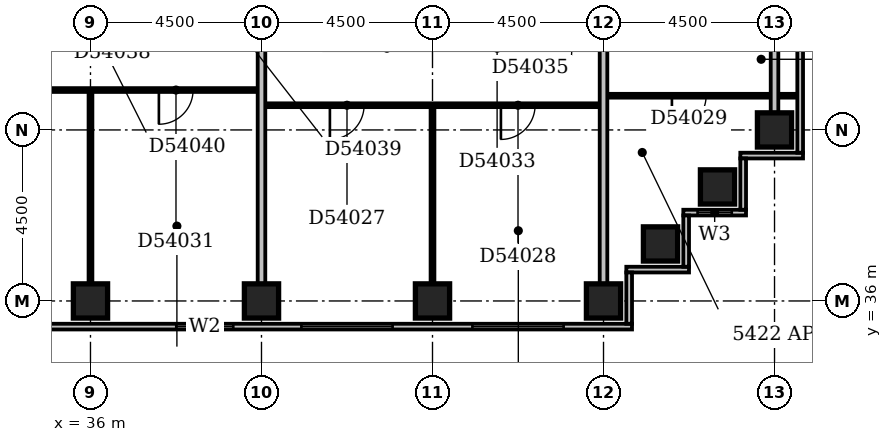
"""IFC4 building model, lengths in metres.
Left out: names, types, materials, properties, quantities, classifications, styles, units other than length and angle.
Written with IfcOpenShell. Run it as: python <this file> out.ifc"""

import sys

from ifc_helpers import new_model, si_unit, direction, frame, frame_2d, origin, origin_2d, place, context, subcontext, project, spatial, rectangle, extrude, element, fill, save


model = new_model("IFC4")
c1 = context("Model", 3, precision=1e-05, world=origin(), true_north=direction((0.0, 1.0)))
c2 = subcontext(c1, "Body", "Model", "MODEL_VIEW")
j1 = project(units=[si_unit("LENGTHUNIT", "METRE"), si_unit("PLANEANGLEUNIT", "RADIAN")], contexts=[c1])
p1 = place(None, origin())
s1 = spatial("IfcSite", under=j1, at=p1, CompositionType="ELEMENT")
p2 = place(p1, origin())
s2 = spatial("IfcBuilding", under=s1, at=p2, CompositionType="ELEMENT")
p3 = place(p2, frame((0.0, 0.0, 211.4)))
s3 = spatial("IfcBuildingStorey", under=s2, at=p3, CompositionType="ELEMENT", Elevation=211.4)
for number, where, z_axis, x_axis in (
    (1, (36.0, 36.0, -0.35), (0.0, 0.0, 1.0), (1.0, 0.0, 0.0)),
    (2, (40.5, 36.0, -0.35), (0.0, 0.0, 1.0), (1.0, 0.0, 0.0)),
    (3, (45.0, 36.0, -0.35), (0.0, 0.0, 1.0), (1.0, 0.0, 0.0)),
    (4, (49.5, 36.0, -0.35), (0.0, 0.0, 1.0), (1.0, 0.0, 0.0)),
    (5, (51.0, 37.5, -0.35), (0.0, 0.0, 1.0), (1.0, 0.0, 0.0)),
    (6, (52.5, 39.0, -0.35), (0.0, 0.0, 1.0), (1.0, 0.0, 0.0)),
    (7, (54.0, 40.5, -0.35), (0.0, 0.0, 1.0), (1.0, 0.0, 0.0)),
):
    element("IfcColumn", number, at=place(p3, frame(where, z_axis=z_axis, x_axis=x_axis)), inside=s3, PredefinedType="COLUMN", context=c2, shape_type="SweptSolid", body=[
        extrude(rectangle(XDim=0.9, YDim=0.9, at=origin_2d()), origin(), (0.0, 0.0, 1.0), 3.65),
    ])
p4 = place(p3, frame((23.1, 35.325, 0.0), z_axis=(0.0, 0.0, 1.0), x_axis=(1.0, 0.0, 0.0)))
e8 = element("IfcWall", 8, at=p4, inside=s3, PredefinedType="STANDARD", context=c2, shape_type="SweptSolid", body=[
    extrude(rectangle(XDim=27.15, YDim=0.15, at=frame_2d((13.575, 0.0))), origin(), (0.0, 0.0, 1.0), 2.7),
])
p5 = place(p4, frame((0.45, 0.0, 0.6)))
e9 = element("IfcOpeningElement", 9, at=p5, cuts=e8, PredefinedType="OPENING", context=c2, shape_type="SweptSolid", body=[
    extrude(rectangle(XDim=2.4, YDim=1.8, at=frame_2d((1.2, 0.9))), frame((0.0, 0.087, 0.0), z_axis=(0.0, -1.0, 0.0), x_axis=(1.0, 0.0, 0.0)), (0.0, 0.0, 1.0), 0.174),
])
p6 = place(p4, frame((4.95, 0.0, 0.6)))
e10 = element("IfcOpeningElement", 10, at=p6, cuts=e8, PredefinedType="OPENING", context=c2, shape_type="SweptSolid", body=[
    extrude(rectangle(XDim=2.4, YDim=1.8, at=frame_2d((1.2, 0.9))), frame((0.0, 0.087, 0.0), z_axis=(0.0, -1.0, 0.0), x_axis=(1.0, 0.0, 0.0)), (0.0, 0.0, 1.0), 0.174),
])
p7 = place(p4, frame((9.062, 0.0, 0.6)))
e11 = element("IfcOpeningElement", 11, at=p7, cuts=e8, PredefinedType="OPENING", context=c2, shape_type="SweptSolid", body=[
    extrude(rectangle(XDim=1.8, YDim=1.8, at=frame_2d((0.9, 0.9))), frame((0.0, 0.087, 0.0), z_axis=(0.0, -1.0, 0.0), x_axis=(1.0, 0.0, 0.0)), (0.0, 0.0, 1.0), 0.174),
])
p8 = place(p4, frame((15.157, 0.0, 0.6)))
e12 = element("IfcOpeningElement", 12, at=p8, cuts=e8, PredefinedType="OPENING", context=c2, shape_type="SweptSolid", body=[
    extrude(rectangle(XDim=1.5, YDim=1.8, at=frame_2d((0.75, 0.9))), frame((0.0, 0.087, 0.0), z_axis=(0.0, -1.0, 0.0), x_axis=(1.0, 0.0, 0.0)), (0.0, 0.0, 1.0), 0.174),
])
p9 = place(p4, frame((18.45, 0.0, 0.6)))
e13 = element("IfcOpeningElement", 13, at=p9, cuts=e8, PredefinedType="OPENING", context=c2, shape_type="SweptSolid", body=[
    extrude(rectangle(XDim=2.4, YDim=1.8, at=frame_2d((1.2, 0.9))), frame((0.0, 0.087, 0.0), z_axis=(0.0, -1.0, 0.0), x_axis=(1.0, 0.0, 0.0)), (0.0, 0.0, 1.0), 0.174),
])
p10 = place(p4, frame((22.95, 0.0, 0.6)))
e14 = element("IfcOpeningElement", 14, at=p10, cuts=e8, PredefinedType="OPENING", context=c2, shape_type="SweptSolid", body=[
    extrude(rectangle(XDim=2.4, YDim=1.8, at=frame_2d((1.2, 0.9))), frame((0.0, 0.087, 0.0), z_axis=(0.0, -1.0, 0.0), x_axis=(1.0, 0.0, 0.0)), (0.0, 0.0, 1.0), 0.174),
])
p11 = place(p3, frame((50.175, 35.4, 0.0), z_axis=(0.0, 0.0, 1.0), x_axis=(0.0, 1.0, 0.0)))
e15 = element("IfcWall", 15, at=p11, inside=s3, PredefinedType="STANDARD", context=c2, shape_type="SweptSolid", body=[
    extrude(rectangle(XDim=1.35, YDim=0.15, at=frame_2d((0.675, 0.0))), origin(), (0.0, 0.0, 1.0), 2.7),
])
p12 = place(p3, frame((50.1, 36.825, 0.0), z_axis=(0.0, 0.0, 1.0), x_axis=(1.0, 0.0, 0.0)))
e16 = element("IfcWall", 16, at=p12, inside=s3, PredefinedType="STANDARD", context=c2, shape_type="SweptSolid", body=[
    extrude(rectangle(XDim=1.65, YDim=0.15, at=frame_2d((0.825, 0.0))), origin(), (0.0, 0.0, 1.0), 2.7),
])
p13 = place(p3, frame((51.675, 36.9, 0.0), z_axis=(0.0, 0.0, 1.0), x_axis=(0.0, 1.0, 0.0)))
e17 = element("IfcWall", 17, at=p13, inside=s3, PredefinedType="STANDARD", context=c2, shape_type="SweptSolid", body=[
    extrude(rectangle(XDim=1.35, YDim=0.15, at=frame_2d((0.675, 0.0))), origin(), (0.0, 0.0, 1.0), 2.7),
])
p14 = place(p3, frame((51.6, 38.325, 0.0), z_axis=(0.0, 0.0, 1.0), x_axis=(1.0, 0.0, 0.0)))
e18 = element("IfcWall", 18, at=p14, inside=s3, PredefinedType="STANDARD", context=c2, shape_type="SweptSolid", body=[
    extrude(rectangle(XDim=1.65, YDim=0.15, at=frame_2d((0.825, 0.0))), origin(), (0.0, 0.0, 1.0), 2.7),
])
p15 = place(p14, frame((0.375, 0.0, 0.6)))
e19 = element("IfcOpeningElement", 19, at=p15, cuts=e18, PredefinedType="OPENING", context=c2, shape_type="SweptSolid", body=[
    extrude(rectangle(XDim=0.9, YDim=1.8, at=frame_2d((0.45, 0.9))), frame((0.0, 0.087, 0.0), z_axis=(0.0, -1.0, 0.0), x_axis=(1.0, 0.0, 0.0)), (0.0, 0.0, 1.0), 0.174),
])
p16 = place(p3, frame((53.175, 38.4, 0.0), z_axis=(0.0, 0.0, 1.0), x_axis=(0.0, 1.0, 0.0)))
e20 = element("IfcWall", 20, at=p16, inside=s3, PredefinedType="STANDARD", context=c2, shape_type="SweptSolid", body=[
    extrude(rectangle(XDim=1.35, YDim=0.15, at=frame_2d((0.675, 0.0))), origin(), (0.0, 0.0, 1.0), 2.7),
])
p17 = place(p3, frame((53.1, 39.825, 0.0), z_axis=(0.0, 0.0, 1.0), x_axis=(1.0, 0.0, 0.0)))
e21 = element("IfcWall", 21, at=p17, inside=s3, PredefinedType="STANDARD", context=c2, shape_type="SweptSolid", body=[
    extrude(rectangle(XDim=1.65, YDim=0.15, at=frame_2d((0.825, 0.0))), origin(), (0.0, 0.0, 1.0), 2.7),
])
p18 = place(p3, frame((54.675, 39.9, 0.0), z_axis=(0.0, 0.0, 1.0), x_axis=(0.0, 1.0, 0.0)))
e22 = element("IfcWall", 22, at=p18, inside=s3, PredefinedType="STANDARD", context=c2, shape_type="SweptSolid", body=[
    extrude(rectangle(XDim=14.85, YDim=0.15, at=frame_2d((7.425, 0.0))), origin(), (0.0, 0.0, 1.0), 2.7),
])
p19 = place(p3, frame((36.0, 36.45, 0.0), z_axis=(0.0, 0.0, 1.0), x_axis=(0.0, 1.0, 0.0)))
e23 = element("IfcWall", 23, at=p19, inside=s3, PredefinedType="PARTITIONING", context=c2, shape_type="SweptSolid", body=[
    extrude(rectangle(XDim=5.05, YDim=0.1, at=frame_2d((2.525, 0.0))), origin(), (0.0, 0.0, 1.0), 2.4),
])
p20 = place(p3, frame((40.5, 36.45, 0.0), z_axis=(0.0, 0.0, 1.0), x_axis=(0.0, 1.0, 0.0)))
e24 = element("IfcWall", 24, at=p20, inside=s3, PredefinedType="PARTITIONING", context=c2, shape_type="SweptSolid", body=[
    extrude(rectangle(XDim=12.95, YDim=0.2, at=frame_2d((6.475, 0.0))), origin(), (0.0, 0.0, 1.0), 3.3),
])
p21 = place(p3, frame((45.0, 36.45, 0.0), z_axis=(0.0, 0.0, 1.0), x_axis=(0.0, 1.0, 0.0)))
e25 = element("IfcWall", 25, at=p21, inside=s3, PredefinedType="PARTITIONING", context=c2, shape_type="SweptSolid", body=[
    extrude(rectangle(XDim=4.65, YDim=0.1, at=frame_2d((2.325, 0.0))), origin(), (0.0, 0.0, 1.0), 2.6),
])
p22 = place(p3, frame((49.5, 36.45, 0.0), z_axis=(0.0, 0.0, 1.0), x_axis=(0.0, 1.0, 0.0)))
e26 = element("IfcWall", 26, at=p22, inside=s3, PredefinedType="PARTITIONING", context=c2, shape_type="SweptSolid", body=[
    extrude(rectangle(XDim=12.95, YDim=0.2, at=frame_2d((6.475, 0.0))), origin(), (0.0, 0.0, 1.0), 3.3),
])
p23 = place(p3, frame((54.0, 40.95, 0.0), z_axis=(0.0, 0.0, 1.0), x_axis=(0.0, 1.0, 0.0)))
e27 = element("IfcWall", 27, at=p23, inside=s3, PredefinedType="PARTITIONING", context=c2, shape_type="SweptSolid", body=[
    extrude(rectangle(XDim=8.1, YDim=0.2, at=frame_2d((4.05, 0.0))), origin(), (0.0, 0.0, 1.0), 2.7),
])
p24 = place(p3, frame((40.6, 41.15, 0.0), z_axis=(0.0, 0.0, 1.0), x_axis=(1.0, 0.0, 0.0)))
e28 = element("IfcWall", 28, at=p24, inside=s3, PredefinedType="PARTITIONING", context=c2, shape_type="SweptSolid", body=[
    extrude(rectangle(XDim=8.8, YDim=0.1, at=frame_2d((4.4, 0.0))), origin(), (0.0, 0.0, 1.0), 3.3),
])
p25 = place(p24, frame((1.7, 0.0, 0.0)))
e29 = element("IfcOpeningElement", 29, at=p25, cuts=e28, PredefinedType="OPENING", context=c2, shape_type="SweptSolid", body=[
    extrude(rectangle(XDim=0.9, YDim=2.1, at=frame_2d((0.45, 1.05))), frame((0.0, 0.062, 0.0), z_axis=(0.0, -1.0, 0.0), x_axis=(1.0, 0.0, 0.0)), (0.0, 0.0, 1.0), 0.124),
])
p26 = place(p24, frame((6.2, 0.0, 0.0)))
e30 = element("IfcOpeningElement", 30, at=p26, cuts=e28, PredefinedType="OPENING", context=c2, shape_type="SweptSolid", body=[
    extrude(rectangle(XDim=0.9, YDim=2.1, at=frame_2d((0.45, 1.05))), frame((0.0, 0.062, 0.0), z_axis=(0.0, -1.0, 0.0), x_axis=(1.0, 0.0, 0.0)), (0.0, 0.0, 1.0), 0.124),
])
p27 = place(p3, frame((49.6, 41.4, 0.0), z_axis=(0.0, 0.0, 1.0), x_axis=(1.0, 0.0, 0.0)))
e31 = element("IfcWall", 31, at=p27, inside=s3, PredefinedType="PARTITIONING", context=c2, shape_type="SweptSolid", body=[
    extrude(rectangle(XDim=5.0, YDim=0.1, at=frame_2d((2.5, 0.0))), origin(), (0.0, 0.0, 1.0), 3.3),
])
p28 = place(p27, frame((1.7, 0.0, 0.0)))
e32 = element("IfcOpeningElement", 32, at=p28, cuts=e31, PredefinedType="OPENING", context=c2, shape_type="SweptSolid", body=[
    extrude(rectangle(XDim=0.9, YDim=2.1, at=frame_2d((0.45, 1.05))), frame((0.0, 0.062, 0.0), z_axis=(0.0, -1.0, 0.0), x_axis=(1.0, 0.0, 0.0)), (0.0, 0.0, 1.0), 0.124),
])
p29 = place(p3, frame((27.1, 41.55, 0.0), z_axis=(0.0, 0.0, 1.0), x_axis=(1.0, 0.0, 0.0)))
e33 = element("IfcWall", 33, at=p29, inside=s3, PredefinedType="PARTITIONING", context=c2, shape_type="SweptSolid", body=[
    extrude(rectangle(XDim=13.3, YDim=0.1, at=frame_2d((6.65, 0.0))), origin(), (0.0, 0.0, 1.0), 3.3),
])
p30 = place(p29, frame((3.9, 0.0, 0.0)))
e34 = element("IfcOpeningElement", 34, at=p30, cuts=e33, PredefinedType="OPENING", context=c2, shape_type="SweptSolid", body=[
    extrude(rectangle(XDim=0.9, YDim=2.1, at=frame_2d((0.45, 1.05))), frame((0.0, 0.062, 0.0), z_axis=(0.0, -1.0, 0.0), x_axis=(1.0, 0.0, 0.0)), (0.0, 0.0, 1.0), 0.124),
])
p31 = place(p29, frame((10.7, 0.0, 0.0)))
e35 = element("IfcOpeningElement", 35, at=p31, cuts=e33, PredefinedType="OPENING", context=c2, shape_type="SweptSolid", body=[
    extrude(rectangle(XDim=0.9, YDim=2.1, at=frame_2d((0.45, 1.05))), frame((0.0, 0.062, 0.0), z_axis=(0.0, -1.0, 0.0), x_axis=(1.0, 0.0, 0.0)), (0.0, 0.0, 1.0), 0.124),
])
p32 = place(p8, origin())
e36 = element("IfcWindow", 36, at=p32, inside=s3, PartitioningType="SINGLE_PANEL", PredefinedType="WINDOW", context=c2, shape_type="SweptSolid", body=[
    extrude(rectangle(XDim=1.5, YDim=1.8, at=frame_2d((0.75, 0.9))), frame((0.0, 0.03, 0.0), z_axis=(0.0, -1.0, 0.0), x_axis=(1.0, 0.0, 0.0)), (0.0, 0.0, 1.0), 0.06),
])
fill(e12, e36)
p33 = place(p9, origin())
e37 = element("IfcWindow", 37, at=p33, inside=s3, PartitioningType="SINGLE_PANEL", PredefinedType="WINDOW", context=c2, shape_type="SweptSolid", body=[
    extrude(rectangle(XDim=2.4, YDim=1.8, at=frame_2d((1.2, 0.9))), frame((0.0, 0.03, 0.0), z_axis=(0.0, -1.0, 0.0), x_axis=(1.0, 0.0, 0.0)), (0.0, 0.0, 1.0), 0.06),
])
fill(e13, e37)
p34 = place(p10, origin())
e38 = element("IfcWindow", 38, at=p34, inside=s3, PartitioningType="SINGLE_PANEL", PredefinedType="WINDOW", context=c2, shape_type="SweptSolid", body=[
    extrude(rectangle(XDim=2.4, YDim=1.8, at=frame_2d((1.2, 0.9))), frame((0.0, 0.03, 0.0), z_axis=(0.0, -1.0, 0.0), x_axis=(1.0, 0.0, 0.0)), (0.0, 0.0, 1.0), 0.06),
])
fill(e14, e38)
p35 = place(p15, origin())
e39 = element("IfcWindow", 39, at=p35, inside=s3, PartitioningType="SINGLE_PANEL", PredefinedType="WINDOW", context=c2, shape_type="SweptSolid", body=[
    extrude(rectangle(XDim=0.9, YDim=1.8, at=frame_2d((0.45, 0.9))), frame((0.0, 0.03, 0.0), z_axis=(0.0, -1.0, 0.0), x_axis=(1.0, 0.0, 0.0)), (0.0, 0.0, 1.0), 0.06),
])
fill(e19, e39)
p36 = place(p25, frame((0.9, 0.0, 0.0), z_axis=(0.0, 0.0, 1.0), x_axis=(-1.0, 0.0, 0.0)))
e40 = element("IfcDoor", 40, at=p36, inside=s3, OperationType="SINGLE_SWING_RIGHT", PredefinedType="DOOR", context=c2, shape_type="SweptSolid", body=[
    extrude(rectangle(XDim=0.9, YDim=2.1, at=frame_2d((0.45, 1.05))), frame((0.0, 0.025, 0.0), z_axis=(0.0, -1.0, 0.0), x_axis=(1.0, 0.0, 0.0)), (0.0, 0.0, 1.0), 0.05),
])
fill(e29, e40)
p37 = place(p26, frame((0.9, 0.0, 0.0), z_axis=(0.0, 0.0, 1.0), x_axis=(-1.0, 0.0, 0.0)))
e41 = element("IfcDoor", 41, at=p37, inside=s3, OperationType="SINGLE_SWING_RIGHT", PredefinedType="DOOR", context=c2, shape_type="SweptSolid", body=[
    extrude(rectangle(XDim=0.9, YDim=2.1, at=frame_2d((0.45, 1.05))), frame((0.0, 0.025, 0.0), z_axis=(0.0, -1.0, 0.0), x_axis=(1.0, 0.0, 0.0)), (0.0, 0.0, 1.0), 0.05),
])
fill(e30, e41)
p38 = place(p28, frame((0.9, 0.0, 0.0), z_axis=(0.0, 0.0, 1.0), x_axis=(-1.0, 0.0, 0.0)))
e42 = element("IfcDoor", 42, at=p38, inside=s3, OperationType="SINGLE_SWING_RIGHT", PredefinedType="DOOR", context=c2, shape_type="SweptSolid", body=[
    extrude(rectangle(XDim=0.9, YDim=2.1, at=frame_2d((0.45, 1.05))), frame((0.0, 0.025, 0.0), z_axis=(0.0, -1.0, 0.0), x_axis=(1.0, 0.0, 0.0)), (0.0, 0.0, 1.0), 0.05),
])
fill(e32, e42)
p39 = place(p31, frame((0.9, 0.0, 0.0), z_axis=(0.0, 0.0, 1.0), x_axis=(-1.0, 0.0, 0.0)))
e43 = element("IfcDoor", 43, at=p39, inside=s3, OperationType="SINGLE_SWING_RIGHT", PredefinedType="DOOR", context=c2, shape_type="SweptSolid", body=[
    extrude(rectangle(XDim=0.9, YDim=2.1, at=frame_2d((0.45, 1.05))), frame((0.0, 0.025, 0.0), z_axis=(0.0, -1.0, 0.0), x_axis=(1.0, 0.0, 0.0)), (0.0, 0.0, 1.0), 0.05),
])
fill(e35, e43)
save(model, sys.argv[1])
